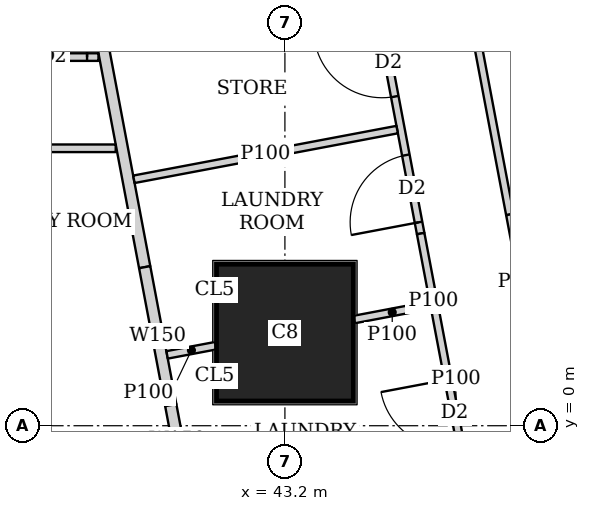
"""IFC4 building model, lengths in metres.
Left out: names, types, materials, properties, quantities, classifications, styles, units other than length and angle.
Written with IfcOpenShell. Run it as: python <this file> out.ifc"""

import sys

from ifc_helpers import new_model, si_unit, direction, frame, frame_2d, origin, origin_2d, place, context, subcontext, project, spatial, rectangle, extrude, element, fill, save


model = new_model("IFC4")
c1 = context("Model", 3, precision=1e-05, world=origin(), true_north=direction((0.0, 1.0)))
c2 = subcontext(c1, "Body", "Model", "MODEL_VIEW")
j1 = project(units=[si_unit("LENGTHUNIT", "METRE"), si_unit("PLANEANGLEUNIT", "RADIAN")], contexts=[c1])
p1 = place(None, origin())
s1 = spatial("IfcSite", under=j1, at=p1, CompositionType="ELEMENT")
p2 = place(p1, origin())
s2 = spatial("IfcBuilding", under=s1, at=p2, CompositionType="ELEMENT")
p3 = place(p2, frame((0.0, 0.0, 184.55)))
s3 = spatial("IfcBuildingStorey", under=s2, at=p3, CompositionType="ELEMENT", Elevation=184.55)
p4 = place(p3, frame((43.2, 1.225, 0.0), z_axis=(0.0, 0.0, 1.0), x_axis=(1.0, 0.0, 0.0)))
e1 = element("IfcColumn", 1, at=p4, inside=s3, PredefinedType="COLUMN", context=c2, shape_type="SweptSolid", body=[
    extrude(rectangle(XDim=1.8, YDim=1.8, at=origin_2d()), origin(), (0.0, 0.0, 1.0), 3.75),
])
p5 = place(p3, frame((50.653, 2.703, 0.0), z_axis=(0.0, 0.0, 1.0), x_axis=(-0.185612026696, 0.982623109613, 0.0)))
e2 = element("IfcWall", 2, at=p5, inside=s3, PredefinedType="SOLIDWALL", context=c2, shape_type="SweptSolid", body=[
    extrude(rectangle(XDim=41.393, YDim=0.2, at=frame_2d((20.697, 0.0))), origin(), (0.0, 0.0, 1.0), 3.45),
])
p6 = place(p5, frame((1.633, 0.0, 0.9)))
e3 = element("IfcOpeningElement", 3, at=p6, cuts=e2, PredefinedType="OPENING", context=c2, shape_type="SweptSolid", body=[
    extrude(rectangle(XDim=1.8, YDim=1.5, at=frame_2d((0.9, 0.75))), frame((0.0, 0.11, 0.0), z_axis=(0.0, -1.0, 0.0), x_axis=(1.0, 0.0, 0.0)), (0.0, 0.0, 1.0), 0.22),
])
p7 = place(p5, frame((6.032, 0.0, 0.9)))
e4 = element("IfcOpeningElement", 4, at=p7, cuts=e2, PredefinedType="OPENING", context=c2, shape_type="SweptSolid", body=[
    extrude(rectangle(XDim=1.8, YDim=1.5, at=frame_2d((0.9, 0.75))), frame((0.0, 0.11, 0.0), z_axis=(0.0, -1.0, 0.0), x_axis=(1.0, 0.0, 0.0)), (0.0, 0.0, 1.0), 0.22),
])
p8 = place(p5, frame((9.848, 0.0, 0.9)))
e5 = element("IfcOpeningElement", 5, at=p8, cuts=e2, PredefinedType="OPENING", context=c2, shape_type="SweptSolid", body=[
    extrude(rectangle(XDim=1.8, YDim=1.5, at=frame_2d((0.9, 0.75))), frame((0.0, 0.11, 0.0), z_axis=(0.0, -1.0, 0.0), x_axis=(1.0, 0.0, 0.0)), (0.0, 0.0, 1.0), 0.22),
])
p9 = place(p5, frame((13.664, 0.0, 0.9)))
e6 = element("IfcOpeningElement", 6, at=p9, cuts=e2, PredefinedType="OPENING", context=c2, shape_type="SweptSolid", body=[
    extrude(rectangle(XDim=1.8, YDim=1.5, at=frame_2d((0.9, 0.75))), frame((0.0, 0.11, 0.0), z_axis=(0.0, -1.0, 0.0), x_axis=(1.0, 0.0, 0.0)), (0.0, 0.0, 1.0), 0.22),
])
p10 = place(p5, frame((17.481, 0.0, 0.9)))
e7 = element("IfcOpeningElement", 7, at=p10, cuts=e2, PredefinedType="OPENING", context=c2, shape_type="SweptSolid", body=[
    extrude(rectangle(XDim=1.8, YDim=1.5, at=frame_2d((0.9, 0.75))), frame((0.0, 0.11, 0.0), z_axis=(0.0, -1.0, 0.0), x_axis=(1.0, 0.0, 0.0)), (0.0, 0.0, 1.0), 0.22),
])
p11 = place(p5, frame((21.297, 0.0, 0.9)))
e8 = element("IfcOpeningElement", 8, at=p11, cuts=e2, PredefinedType="OPENING", context=c2, shape_type="SweptSolid", body=[
    extrude(rectangle(XDim=1.8, YDim=1.5, at=frame_2d((0.9, 0.75))), frame((0.0, 0.11, 0.0), z_axis=(0.0, -1.0, 0.0), x_axis=(1.0, 0.0, 0.0)), (0.0, 0.0, 1.0), 0.22),
])
p12 = place(p5, frame((25.113, 0.0, 0.9)))
e9 = element("IfcOpeningElement", 9, at=p12, cuts=e2, PredefinedType="OPENING", context=c2, shape_type="SweptSolid", body=[
    extrude(rectangle(XDim=1.8, YDim=1.5, at=frame_2d((0.9, 0.75))), frame((0.0, 0.11, 0.0), z_axis=(0.0, -1.0, 0.0), x_axis=(1.0, 0.0, 0.0)), (0.0, 0.0, 1.0), 0.22),
])
p13 = place(p5, frame((28.93, 0.0, 0.9)))
e10 = element("IfcOpeningElement", 10, at=p13, cuts=e2, PredefinedType="OPENING", context=c2, shape_type="SweptSolid", body=[
    extrude(rectangle(XDim=1.8, YDim=1.5, at=frame_2d((0.9, 0.75))), frame((0.0, 0.11, 0.0), z_axis=(0.0, -1.0, 0.0), x_axis=(1.0, 0.0, 0.0)), (0.0, 0.0, 1.0), 0.22),
])
p14 = place(p5, frame((32.746, 0.0, 0.9)))
e11 = element("IfcOpeningElement", 11, at=p14, cuts=e2, PredefinedType="OPENING", context=c2, shape_type="SweptSolid", body=[
    extrude(rectangle(XDim=1.8, YDim=1.5, at=frame_2d((0.9, 0.75))), frame((0.0, 0.11, 0.0), z_axis=(0.0, -1.0, 0.0), x_axis=(1.0, 0.0, 0.0)), (0.0, 0.0, 1.0), 0.22),
])
p15 = place(p5, frame((36.481, 0.0, 0.9)))
e12 = element("IfcOpeningElement", 12, at=p15, cuts=e2, PredefinedType="OPENING", context=c2, shape_type="SweptSolid", body=[
    extrude(rectangle(XDim=1.8, YDim=1.5, at=frame_2d((0.9, 0.75))), frame((0.0, 0.11, 0.0), z_axis=(0.0, -1.0, 0.0), x_axis=(1.0, 0.0, 0.0)), (0.0, 0.0, 1.0), 0.22),
])
p16 = place(p3, frame((33.623, 43.022, 0.0), z_axis=(0.0, 0.0, 1.0), x_axis=(0.185596841028, -0.98262597798, 0.0)))
e13 = element("IfcWall", 13, at=p16, inside=s3, PredefinedType="SOLIDWALL", context=c2, shape_type="SweptSolid", body=[
    extrude(rectangle(XDim=41.66, YDim=0.15, at=frame_2d((20.83, 0.0))), origin(), (0.0, 0.0, 1.0), 2.45),
])
p17 = place(p16, frame((8.034, 0.0, 0.0)))
e14 = element("IfcOpeningElement", 14, at=p17, cuts=e13, PredefinedType="OPENING", context=c2, shape_type="SweptSolid", body=[
    extrude(rectangle(XDim=1.0, YDim=2.1, at=frame_2d((0.5, 1.05))), frame((0.0, 0.085, 0.0), z_axis=(0.0, -1.0, 0.0), x_axis=(1.0, 0.0, 0.0)), (0.0, 0.0, 1.0), 0.17),
])
p18 = place(p16, frame((12.611, 0.0, 0.0)))
e15 = element("IfcOpeningElement", 15, at=p18, cuts=e13, PredefinedType="OPENING", context=c2, shape_type="SweptSolid", body=[
    extrude(rectangle(XDim=1.0, YDim=2.1, at=frame_2d((0.5, 1.05))), frame((0.0, 0.085, 0.0), z_axis=(0.0, -1.0, 0.0), x_axis=(1.0, 0.0, 0.0)), (0.0, 0.0, 1.0), 0.17),
])
p19 = place(p16, frame((20.242, 0.0, 0.0)))
e16 = element("IfcOpeningElement", 16, at=p19, cuts=e13, PredefinedType="OPENING", context=c2, shape_type="SweptSolid", body=[
    extrude(rectangle(XDim=1.0, YDim=2.1, at=frame_2d((0.5, 1.05))), frame((0.0, 0.085, 0.0), z_axis=(0.0, -1.0, 0.0), x_axis=(1.0, 0.0, 0.0)), (0.0, 0.0, 1.0), 0.17),
])
p20 = place(p16, frame((31.206, 0.0, 0.0)))
e17 = element("IfcOpeningElement", 17, at=p20, cuts=e13, PredefinedType="OPENING", context=c2, shape_type="SweptSolid", body=[
    extrude(rectangle(XDim=1.0, YDim=2.1, at=frame_2d((0.5, 1.05))), frame((0.0, 0.085, 0.0), z_axis=(0.0, -1.0, 0.0), x_axis=(1.0, 0.0, 0.0)), (0.0, 0.0, 1.0), 0.17),
])
p21 = place(p3, frame((41.355, 2.086, 0.0), z_axis=(0.0, 0.0, 1.0), x_axis=(0.185708872674, -0.982604811005, 0.0)))
e18 = element("IfcWall", 18, at=p21, inside=s3, PredefinedType="SOLIDWALL", context=c2, shape_type="SweptSolid", body=[
    extrude(rectangle(XDim=1.847, YDim=0.15, at=frame_2d((0.924, 0.0))), origin(), (0.0, 0.0, 1.0), 2.05),
])
p22 = place(p3, frame((41.698, 0.271, 0.0), z_axis=(0.0, 0.0, 1.0), x_axis=(0.185735329995, -0.982599810295, 0.0)))
e19 = element("IfcWall", 19, at=p22, inside=s3, PredefinedType="SOLIDWALL", context=c2, shape_type="SweptSolid", body=[
    extrude(rectangle(XDim=0.937, YDim=0.15, at=frame_2d((0.469, 0.0))), origin(), (0.0, 0.0, 1.0), 3.45),
])
p23 = place(p3, frame((40.974, 3.65, 0.0), z_axis=(0.0, 0.0, 1.0), x_axis=(-1.0, 0.0, 0.0)))
e20 = element("IfcWall", 20, at=p23, inside=s3, PredefinedType="PARTITIONING", context=c2, shape_type="SweptSolid", body=[
    extrude(rectangle(XDim=8.574, YDim=0.1, at=frame_2d((4.287, 0.0))), origin(), (0.0, 0.0, 1.0), 3.45),
])
p24 = place(p23, frame((7.474, 0.0, 0.0)))
e21 = element("IfcOpeningElement", 21, at=p24, cuts=e20, PredefinedType="OPENING", context=c2, shape_type="SweptSolid", body=[
    extrude(rectangle(XDim=0.9, YDim=2.1, at=frame_2d((0.45, 1.05))), frame((0.0, 0.06, 0.0), z_axis=(0.0, -1.0, 0.0), x_axis=(1.0, 0.0, 0.0)), (0.0, 0.0, 1.0), 0.12),
])
p25 = place(p23, frame((3.874, 0.0, 0.0)))
e22 = element("IfcOpeningElement", 22, at=p25, cuts=e20, PredefinedType="OPENING", context=c2, shape_type="SweptSolid", body=[
    extrude(rectangle(XDim=0.9, YDim=2.1, at=frame_2d((0.45, 1.05))), frame((0.0, 0.06, 0.0), z_axis=(0.0, -1.0, 0.0), x_axis=(1.0, 0.0, 0.0)), (0.0, 0.0, 1.0), 0.12),
])
p26 = place(p3, frame((40.747, 4.85, 0.0), z_axis=(0.0, 0.0, 1.0), x_axis=(-1.0, 0.0, 0.0)))
e23 = element("IfcWall", 23, at=p26, inside=s3, PredefinedType="PARTITIONING", context=c2, shape_type="SweptSolid", body=[
    extrude(rectangle(XDim=8.347, YDim=0.1, at=frame_2d((4.174, 0.0))), origin(), (0.0, 0.0, 1.0), 3.45),
])
p27 = place(p26, frame((6.872, 0.0, 0.0)))
e24 = element("IfcOpeningElement", 24, at=p27, cuts=e23, PredefinedType="OPENING", context=c2, shape_type="SweptSolid", body=[
    extrude(rectangle(XDim=0.9, YDim=2.1, at=frame_2d((0.45, 1.05))), frame((0.0, 0.06, 0.0), z_axis=(0.0, -1.0, 0.0), x_axis=(1.0, 0.0, 0.0)), (0.0, 0.0, 1.0), 0.12),
])
p28 = place(p26, frame((3.497, 0.0, 0.0)))
e25 = element("IfcOpeningElement", 25, at=p28, cuts=e23, PredefinedType="OPENING", context=c2, shape_type="SweptSolid", body=[
    extrude(rectangle(XDim=0.9, YDim=2.1, at=frame_2d((0.45, 1.05))), frame((0.0, 0.06, 0.0), z_axis=(0.0, -1.0, 0.0), x_axis=(1.0, 0.0, 0.0)), (0.0, 0.0, 1.0), 0.12),
])
p29 = place(p26, frame((0.15, 0.0, 0.0)))
e26 = element("IfcOpeningElement", 26, at=p29, cuts=e23, PredefinedType="OPENING", context=c2, shape_type="SweptSolid", body=[
    extrude(rectangle(XDim=0.9, YDim=2.1, at=frame_2d((0.45, 1.05))), frame((0.0, 0.06, 0.0), z_axis=(0.0, -1.0, 0.0), x_axis=(1.0, 0.0, 0.0)), (0.0, 0.0, 1.0), 0.12),
])
p30 = place(p26, frame((5.072, 0.0, 0.0)))
e27 = element("IfcOpeningElement", 27, at=p30, cuts=e23, PredefinedType="OPENING", context=c2, shape_type="SweptSolid", body=[
    extrude(rectangle(XDim=0.9, YDim=2.1, at=frame_2d((0.45, 1.05))), frame((0.0, 0.06, 0.0), z_axis=(0.0, -1.0, 0.0), x_axis=(1.0, 0.0, 0.0)), (0.0, 0.0, 1.0), 0.12),
])
p31 = place(p26, frame((1.697, 0.0, 0.0)))
e28 = element("IfcOpeningElement", 28, at=p31, cuts=e23, PredefinedType="OPENING", context=c2, shape_type="SweptSolid", body=[
    extrude(rectangle(XDim=0.9, YDim=2.1, at=frame_2d((0.45, 1.05))), frame((0.0, 0.06, 0.0), z_axis=(0.0, -1.0, 0.0), x_axis=(1.0, 0.0, 0.0)), (0.0, 0.0, 1.0), 0.12),
])
p32 = place(p3, frame((44.727, 10.366, 0.0), z_axis=(0.0, 0.0, 1.0), x_axis=(0.185578957652, -0.982629355595, 0.0)))
e29 = element("IfcWall", 29, at=p32, inside=s3, PredefinedType="PARTITIONING", context=c2, shape_type="SweptSolid", body=[
    extrude(rectangle(XDim=7.721, YDim=0.1, at=frame_2d((3.86, 0.0))), origin(), (0.0, 0.0, 1.0), 3.45),
])
p33 = place(p32, frame((0.151, 0.0, 0.0)))
e30 = element("IfcOpeningElement", 30, at=p33, cuts=e29, PredefinedType="OPENING", context=c2, shape_type="SweptSolid", body=[
    extrude(rectangle(XDim=0.9, YDim=2.1, at=frame_2d((0.45, 1.05))), frame((0.0, 0.06, 0.0), z_axis=(0.0, -1.0, 0.0), x_axis=(1.0, 0.0, 0.0)), (0.0, 0.0, 1.0), 0.12),
])
p34 = place(p32, frame((3.806, 0.0, 0.0)))
e31 = element("IfcOpeningElement", 31, at=p34, cuts=e29, PredefinedType="OPENING", context=c2, shape_type="SweptSolid", body=[
    extrude(rectangle(XDim=0.9, YDim=2.1, at=frame_2d((0.45, 1.05))), frame((0.0, 0.06, 0.0), z_axis=(0.0, -1.0, 0.0), x_axis=(1.0, 0.0, 0.0)), (0.0, 0.0, 1.0), 0.12),
])
p35 = place(p3, frame((46.16, 2.779, 0.0), z_axis=(0.0, 0.0, 1.0), x_axis=(0.18597295662, -0.982554863306, 0.0)))
e32 = element("IfcWall", 32, at=p35, inside=s3, PredefinedType="PARTITIONING", context=c2, shape_type="SweptSolid", body=[
    extrude(rectangle(XDim=1.802, YDim=0.1, at=frame_2d((0.901, 0.0))), origin(), (0.0, 0.0, 1.0), 2.05),
])
p36 = place(p3, frame((43.999, 7.755, 0.0), z_axis=(0.0, 0.0, 1.0), x_axis=(0.185565904578, -0.982631820703, 0.0)))
e33 = element("IfcWall", 33, at=p36, inside=s3, PredefinedType="PARTITIONING", context=c2, shape_type="SweptSolid", body=[
    extrude(rectangle(XDim=5.319, YDim=0.1, at=frame_2d((2.66, 0.0))), origin(), (0.0, 0.0, 1.0), 3.45),
])
p37 = place(p36, frame((1.0, 0.0, 0.0)))
e34 = element("IfcOpeningElement", 34, at=p37, cuts=e33, PredefinedType="OPENING", context=c2, shape_type="SweptSolid", body=[
    extrude(rectangle(XDim=0.9, YDim=2.1, at=frame_2d((0.45, 1.05))), frame((0.0, 0.06, 0.0), z_axis=(0.0, -1.0, 0.0), x_axis=(1.0, 0.0, 0.0)), (0.0, 0.0, 1.0), 0.12),
])
p38 = place(p36, frame((4.269, 0.0, 0.0)))
e35 = element("IfcOpeningElement", 35, at=p38, cuts=e33, PredefinedType="OPENING", context=c2, shape_type="SweptSolid", body=[
    extrude(rectangle(XDim=0.9, YDim=2.1, at=frame_2d((0.45, 1.05))), frame((0.0, 0.06, 0.0), z_axis=(0.0, -1.0, 0.0), x_axis=(1.0, 0.0, 0.0)), (0.0, 0.0, 1.0), 0.12),
])
p39 = place(p36, frame((2.585, 0.0, 0.0)))
e36 = element("IfcOpeningElement", 36, at=p39, cuts=e33, PredefinedType="OPENING", context=c2, shape_type="SweptSolid", body=[
    extrude(rectangle(XDim=0.9, YDim=2.1, at=frame_2d((0.45, 1.05))), frame((0.0, 0.06, 0.0), z_axis=(0.0, -1.0, 0.0), x_axis=(1.0, 0.0, 0.0)), (0.0, 0.0, 1.0), 0.12),
])
p40 = place(p3, frame((44.986, 2.528, 0.0), z_axis=(0.0, 0.0, 1.0), x_axis=(0.18584218627, -0.982579605835, 0.0)))
e37 = element("IfcWall", 37, at=p40, inside=s3, PredefinedType="PARTITIONING", context=c2, shape_type="SweptSolid", body=[
    extrude(rectangle(XDim=1.802, YDim=0.1, at=frame_2d((0.901, 0.0))), origin(), (0.0, 0.0, 1.0), 2.05),
])
p41 = place(p3, frame((45.321, 0.757, 0.0), z_axis=(0.0, 0.0, 1.0), x_axis=(0.185640562635, -0.982617718904, 0.0)))
e38 = element("IfcWall", 38, at=p41, inside=s3, PredefinedType="PARTITIONING", context=c2, shape_type="SweptSolid", body=[
    extrude(rectangle(XDim=1.395, YDim=0.1, at=frame_2d((0.698, 0.0))), origin(), (0.0, 0.0, 1.0), 3.45),
])
p42 = place(p41, frame((0.15, 0.0, 0.0)))
e39 = element("IfcOpeningElement", 39, at=p42, cuts=e38, PredefinedType="OPENING", context=c2, shape_type="SweptSolid", body=[
    extrude(rectangle(XDim=0.9, YDim=2.1, at=frame_2d((0.45, 1.05))), frame((0.0, 0.06, 0.0), z_axis=(0.0, -1.0, 0.0), x_axis=(1.0, 0.0, 0.0)), (0.0, 0.0, 1.0), 0.12),
])
p43 = place(p3, frame((45.114, 1.587, 0.0), z_axis=(0.0, 0.0, 1.0), x_axis=(-0.982567886437, -0.185904138047, 0.0)))
e40 = element("IfcWall", 40, at=p43, inside=s3, PredefinedType="PARTITIONING", context=c2, shape_type="SweptSolid", body=[
    extrude(rectangle(XDim=1.022, YDim=0.1, at=frame_2d((0.511, 0.0))), origin(), (0.0, 0.0, 1.0), 2.05),
])
p44 = place(p3, frame((42.29, 1.053, 0.0), z_axis=(0.0, 0.0, 1.0), x_axis=(-0.982573945355, -0.185872111707, 0.0)))
e41 = element("IfcWall", 41, at=p44, inside=s3, PredefinedType="PARTITIONING", context=c2, shape_type="SweptSolid", body=[
    extrude(rectangle(XDim=0.652, YDim=0.1, at=frame_2d((0.326, 0.0))), origin(), (0.0, 0.0, 1.0), 2.05),
])
p45 = place(p3, frame((44.677, 3.896, 0.0), z_axis=(0.0, 0.0, 1.0), x_axis=(-0.982638553676, -0.185530247748, 0.0)))
e42 = element("IfcWall", 42, at=p45, inside=s3, PredefinedType="PARTITIONING", context=c2, shape_type="SweptSolid", body=[
    extrude(rectangle(XDim=3.525, YDim=0.1, at=frame_2d((1.763, 0.0))), origin(), (0.0, 0.0, 1.0), 3.45),
])
p46 = place(p29, origin())
e43 = element("IfcDoor", 43, at=p46, inside=s3, OperationType="SINGLE_SWING_RIGHT", PredefinedType="DOOR", context=c2, shape_type="SweptSolid", body=[
    extrude(rectangle(XDim=0.9, YDim=2.1, at=frame_2d((0.45, 1.05))), frame((0.0, 0.025, 0.0), z_axis=(0.0, -1.0, 0.0), x_axis=(1.0, 0.0, 0.0)), (0.0, 0.0, 1.0), 0.05),
])
fill(e26, e43)
p47 = place(p38, origin())
e44 = element("IfcDoor", 44, at=p47, inside=s3, OperationType="SINGLE_SWING_LEFT", PredefinedType="DOOR", context=c2, shape_type="SweptSolid", body=[
    extrude(rectangle(XDim=0.9, YDim=2.1, at=frame_2d((0.45, 1.05))), frame((0.0, 0.025, 0.0), z_axis=(0.0, -1.0, 0.0), x_axis=(1.0, 0.0, 0.0)), (0.0, 0.0, 1.0), 0.05),
])
fill(e35, e44)
p48 = place(p42, origin())
e45 = element("IfcDoor", 45, at=p48, inside=s3, OperationType="SINGLE_SWING_RIGHT", PredefinedType="DOOR", context=c2, shape_type="SweptSolid", body=[
    extrude(rectangle(XDim=0.9, YDim=2.1, at=frame_2d((0.45, 1.05))), frame((0.0, 0.025, 0.0), z_axis=(0.0, -1.0, 0.0), x_axis=(1.0, 0.0, 0.0)), (0.0, 0.0, 1.0), 0.05),
])
fill(e39, e45)
p49 = place(p39, origin())
e46 = element("IfcDoor", 46, at=p49, inside=s3, OperationType="SINGLE_SWING_RIGHT", PredefinedType="DOOR", context=c2, shape_type="SweptSolid", body=[
    extrude(rectangle(XDim=0.9, YDim=2.1, at=frame_2d((0.45, 1.05))), frame((0.0, 0.025, 0.0), z_axis=(0.0, -1.0, 0.0), x_axis=(1.0, 0.0, 0.0)), (0.0, 0.0, 1.0), 0.05),
])
fill(e36, e46)
save(model, sys.argv[1])
